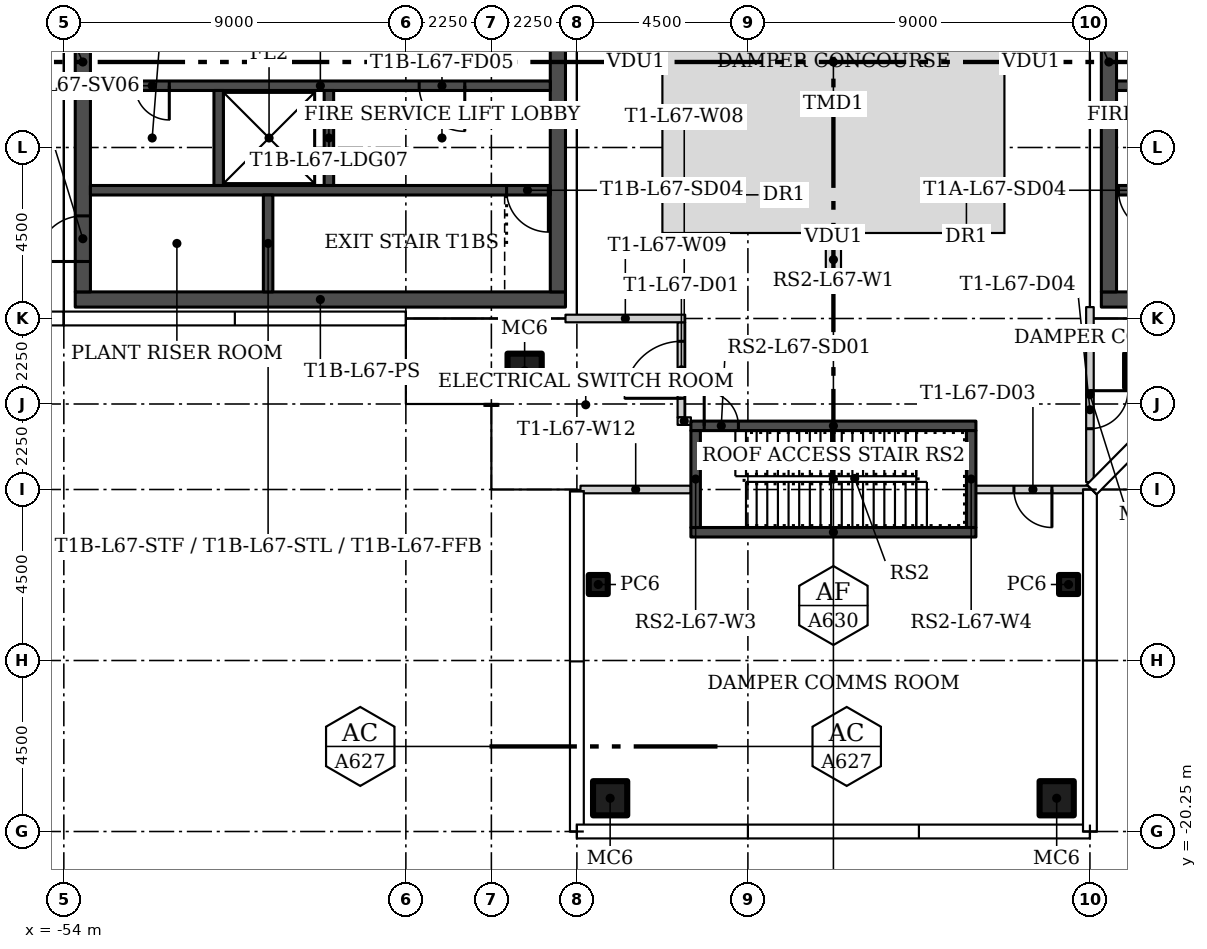
"""IFC4 building model, lengths in metres.
Left out: names, types, materials, properties, quantities, classifications, styles, units other than length and angle.
Written with IfcOpenShell. Run it as: python <this file> out.ifc"""

import sys

from ifc_helpers import new_model, si_unit, direction, frame, frame_2d, origin, origin_2d, place, context, subcontext, project, spatial, rectangle, hollow_rectangle, extrude, element, fill, save


model = new_model("IFC4")
c1 = context("Model", 3, precision=1e-05, world=origin(), true_north=direction((0.0, 1.0)))
c2 = subcontext(c1, "Body", "Model", "MODEL_VIEW")
j1 = project(units=[si_unit("LENGTHUNIT", "METRE"), si_unit("PLANEANGLEUNIT", "RADIAN")], contexts=[c1])
p1 = place(None, origin())
s1 = spatial("IfcSite", under=j1, at=p1, CompositionType="ELEMENT")
p2 = place(p1, origin())
s2 = spatial("IfcBuilding", under=s1, at=p2, CompositionType="ELEMENT")
p3 = place(p2, frame((0.0, 0.0, 278.3)))
s3 = spatial("IfcBuildingStorey", under=s2, at=p3, CompositionType="ELEMENT", Elevation=278.3)
for number, where in (
    (1, (-25.625, -8.125, 0.0)),
    (2, (-41.875, -8.125, 0.0)),
):
    element("IfcColumn", number, at=place(p3, frame(where)), inside=s3, PredefinedType="COLUMN", context=c2, shape_type="SweptSolid", body=[
        extrude(hollow_rectangle(XDim=0.9, YDim=0.9, WallThickness=0.036, at=origin_2d()), origin(), (0.0, 0.0, 1.0), 5.55),
    ])
p4 = place(p3, frame((-39.938, -13.75, 0.0)))
e3 = element("IfcColumn", 3, at=p4, inside=s3, PredefinedType="COLUMN", context=c2, shape_type="SweptSolid", body=[
    extrude(hollow_rectangle(XDim=0.5, YDim=0.5, WallThickness=0.016, at=origin_2d()), origin(), (0.0, 0.0, 1.0), 5.55),
])
p5 = place(p3, frame((-39.625, -19.375, 0.0)))
e4 = element("IfcColumn", 4, at=p5, inside=s3, PredefinedType="COLUMN", context=c2, shape_type="SweptSolid", body=[
    extrude(hollow_rectangle(XDim=0.9, YDim=0.9, WallThickness=0.036, at=origin_2d()), origin(), (0.0, 0.0, 1.0), 5.55),
])
p6 = place(p3, frame((-27.562, -13.75, 0.0)))
e5 = element("IfcColumn", 5, at=p6, inside=s3, PredefinedType="COLUMN", context=c2, shape_type="SweptSolid", body=[
    extrude(hollow_rectangle(XDim=0.5, YDim=0.5, WallThickness=0.016, at=origin_2d()), origin(), (0.0, 0.0, 1.0), 5.55),
])
p7 = place(p3, frame((-27.875, -19.375, 0.0)))
e6 = element("IfcColumn", 6, at=p7, inside=s3, PredefinedType="COLUMN", context=c2, shape_type="SweptSolid", body=[
    extrude(hollow_rectangle(XDim=0.9, YDim=0.9, WallThickness=0.036, at=origin_2d()), origin(), (0.0, 0.0, 1.0), 5.55),
])
p8 = place(p3, frame((-37.75, -9.35, 0.0), z_axis=(0.0, 0.0, 1.0), x_axis=(0.0, 1.0, 0.0)))
e7 = element("IfcWall", 7, at=p8, inside=s3, PredefinedType="PARTITIONING", context=c2, shape_type="SweptSolid", body=[
    extrude(rectangle(XDim=2.5, YDim=0.2, at=frame_2d((1.25, 0.0))), origin(), (0.0, 0.0, 1.0), 5.55),
])
p9 = place(p8, frame((0.5, 0.0, 0.0)))
e8 = element("IfcOpeningElement", 8, at=p9, cuts=e7, PredefinedType="OPENING", context=c2, shape_type="SweptSolid", body=[
    extrude(rectangle(XDim=1.5, YDim=2.4, at=frame_2d((0.75, 1.2))), frame((0.0, 0.11, 0.0), z_axis=(0.0, -1.0, 0.0), x_axis=(1.0, 0.0, 0.0)), (0.0, 0.0, 1.0), 0.22),
])
p10 = place(p3, frame((-37.5, -9.45, 0.0), z_axis=(0.0, 0.0, 1.0), x_axis=(-1.0, 0.0, 0.0)))
e9 = element("IfcWall", 9, at=p10, inside=s3, PredefinedType="PARTITIONING", context=c2, shape_type="SweptSolid", body=[
    extrude(rectangle(XDim=0.35, YDim=0.2, at=frame_2d((0.175, 0.0))), origin(), (0.0, 0.0, 1.0), 5.55),
])
p11 = place(p3, frame((-37.65, -6.75, 0.0), z_axis=(0.0, 0.0, 1.0), x_axis=(-1.0, 0.0, 0.0)))
e10 = element("IfcWall", 10, at=p11, inside=s3, PredefinedType="PARTITIONING", context=c2, shape_type="SweptSolid", body=[
    extrude(rectangle(XDim=3.15, YDim=0.2, at=frame_2d((1.575, 0.0))), origin(), (0.0, 0.0, 1.0), 5.55),
])
p12 = place(p3, frame((-26.995, -11.25, 0.0), z_axis=(0.0, 0.0, 1.0), x_axis=(-1.0, 0.0, 0.0)))
e11 = element("IfcWall", 11, at=p12, inside=s3, PredefinedType="PARTITIONING", context=c2, shape_type="SweptSolid", body=[
    extrude(rectangle(XDim=3.005, YDim=0.2, at=frame_2d((1.502, 0.0))), origin(), (0.0, 0.0, 1.0), 5.55),
])
p13 = place(p12, frame((1.005, 0.0, 0.0)))
e12 = element("IfcOpeningElement", 12, at=p13, cuts=e11, PredefinedType="OPENING", context=c2, shape_type="SweptSolid", body=[
    extrude(rectangle(XDim=1.0, YDim=2.1, at=frame_2d((0.5, 1.05))), frame((0.0, 0.11, 0.0), z_axis=(0.0, -1.0, 0.0), x_axis=(1.0, 0.0, 0.0)), (0.0, 0.0, 1.0), 0.22),
])
p14 = place(p3, frame((-27.0, -6.45, 0.0), z_axis=(0.0, 0.0, 1.0), x_axis=(0.0, -1.0, 0.0)))
e13 = element("IfcWall", 13, at=p14, inside=s3, PredefinedType="PARTITIONING", context=c2, shape_type="SweptSolid", body=[
    extrude(rectangle(XDim=4.605, YDim=0.2, at=frame_2d((2.302, 0.0))), origin(), (0.0, 0.0, 1.0), 5.55),
])
p15 = place(p14, frame((2.2, 0.0, 0.0)))
e14 = element("IfcOpeningElement", 14, at=p15, cuts=e13, PredefinedType="OPENING", context=c2, shape_type="SweptSolid", body=[
    extrude(rectangle(XDim=1.0, YDim=2.1, at=frame_2d((0.5, 1.05))), frame((0.0, 0.11, 0.0), z_axis=(0.0, -1.0, 0.0), x_axis=(1.0, 0.0, 0.0)), (0.0, 0.0, 1.0), 0.22),
])
p16 = place(p3, frame((-40.405, -11.25, 0.0)))
e15 = element("IfcWall", 15, at=p16, inside=s3, PredefinedType="PARTITIONING", context=c2, shape_type="SweptSolid", body=[
    extrude(rectangle(XDim=2.905, YDim=0.2, at=frame_2d((1.453, 0.0))), origin(), (0.0, 0.0, 1.0), 5.55),
])
p17 = place(p3, frame((-26.7, -6.25, 0.0)))
e16 = element("IfcWall", 16, at=p17, inside=s3, PredefinedType="SHEAR", context=c2, shape_type="SweptSolid", body=[
    extrude(rectangle(XDim=12.9, YDim=0.4, at=frame_2d((6.45, 0.0))), origin(), (0.0, 0.0, 1.0), 5.55),
])
p18 = place(p3, frame((-26.5, 6.05, 0.0), z_axis=(0.0, 0.0, 1.0), x_axis=(0.0, -1.0, 0.0)))
e17 = element("IfcWall", 17, at=p18, inside=s3, PredefinedType="SHEAR", context=c2, shape_type="SweptSolid", body=[
    extrude(rectangle(XDim=12.1, YDim=0.4, at=frame_2d((6.05, 0.0))), origin(), (0.0, 0.0, 1.0), 5.55),
])
p19 = place(p18, frame((3.9, 0.0, 0.0)))
e18 = element("IfcOpeningElement", 18, at=p19, cuts=e17, PredefinedType="OPENING", context=c2, shape_type="SweptSolid", body=[
    extrude(rectangle(XDim=1.8, YDim=2.4, at=frame_2d((0.9, 1.2))), frame((0.0, 0.21, 0.0), z_axis=(0.0, -1.0, 0.0), x_axis=(1.0, 0.0, 0.0)), (0.0, 0.0, 1.0), 0.42),
])
p20 = place(p3, frame((-14.2, -3.375, 0.0), z_axis=(0.0, 0.0, 1.0), x_axis=(-1.0, 0.0, 0.0)))
e19 = element("IfcWall", 19, at=p20, inside=s3, PredefinedType="SHEAR", context=c2, shape_type="SweptSolid", body=[
    extrude(rectangle(XDim=12.1, YDim=0.25, at=frame_2d((6.05, 0.0))), origin(), (0.0, 0.0, 1.0), 5.55),
])
p21 = place(p20, frame((10.95, 0.0, 0.0)))
e20 = element("IfcOpeningElement", 20, at=p21, cuts=e19, PredefinedType="OPENING", context=c2, shape_type="SweptSolid", body=[
    extrude(rectangle(XDim=1.1, YDim=2.1, at=frame_2d((0.55, 1.05))), frame((0.0, 0.135, 0.0), z_axis=(0.0, -1.0, 0.0), x_axis=(1.0, 0.0, 0.0)), (0.0, 0.0, 1.0), 0.27),
])
p22 = place(p3, frame((-14.2, -0.625, 0.0), z_axis=(0.0, 0.0, 1.0), x_axis=(-1.0, 0.0, 0.0)))
e21 = element("IfcWall", 21, at=p22, inside=s3, PredefinedType="SHEAR", context=c2, shape_type="SweptSolid", body=[
    extrude(rectangle(XDim=12.1, YDim=0.25, at=frame_2d((6.05, 0.0))), origin(), (0.0, 0.0, 1.0), 5.55),
])
p23 = place(p22, frame((8.65, 0.0, 0.0)))
e22 = element("IfcOpeningElement", 22, at=p23, cuts=e21, PredefinedType="OPENING", context=c2, shape_type="SweptSolid", body=[
    extrude(rectangle(XDim=1.2, YDim=2.1, at=frame_2d((0.6, 1.05))), frame((0.0, 0.135, 0.0), z_axis=(0.0, -1.0, 0.0), x_axis=(1.0, 0.0, 0.0)), (0.0, 0.0, 1.0), 0.27),
])
p24 = place(p22, frame((1.175, 0.0, 0.0)))
e23 = element("IfcOpeningElement", 23, at=p24, cuts=e21, PredefinedType="OPENING", context=c2, shape_type="SweptSolid", body=[
    extrude(rectangle(XDim=0.9, YDim=2.1, at=frame_2d((0.45, 1.05))), frame((0.0, 0.135, 0.0), z_axis=(0.0, -1.0, 0.0), x_axis=(1.0, 0.0, 0.0)), (0.0, 0.0, 1.0), 0.27),
])
p25 = place(p3, frame((-40.8, -6.25, 0.0), z_axis=(0.0, 0.0, 1.0), x_axis=(-1.0, 0.0, 0.0)))
e24 = element("IfcWall", 24, at=p25, inside=s3, PredefinedType="SHEAR", context=c2, shape_type="SweptSolid", body=[
    extrude(rectangle(XDim=12.9, YDim=0.4, at=frame_2d((6.45, 0.0))), origin(), (0.0, 0.0, 1.0), 5.55),
])
p26 = place(p3, frame((-41.0, -6.05, 0.0), z_axis=(0.0, 0.0, 1.0), x_axis=(0.0, 1.0, 0.0)))
e25 = element("IfcWall", 25, at=p26, inside=s3, PredefinedType="SHEAR", context=c2, shape_type="SweptSolid", body=[
    extrude(rectangle(XDim=12.1, YDim=0.4, at=frame_2d((6.05, 0.0))), origin(), (0.0, 0.0, 1.0), 5.55),
])
p27 = place(p26, frame((6.4, 0.0, 0.0)))
e26 = element("IfcOpeningElement", 26, at=p27, cuts=e25, PredefinedType="OPENING", context=c2, shape_type="SweptSolid", body=[
    extrude(rectangle(XDim=1.8, YDim=2.4, at=frame_2d((0.9, 1.2))), frame((0.0, 0.21, 0.0), z_axis=(0.0, -1.0, 0.0), x_axis=(1.0, 0.0, 0.0)), (0.0, 0.0, 1.0), 0.42),
])
p28 = place(p3, frame((-53.5, -6.05, 0.0), z_axis=(0.0, 0.0, 1.0), x_axis=(0.0, 1.0, 0.0)))
e27 = element("IfcWall", 27, at=p28, inside=s3, PredefinedType="SHEAR", context=c2, shape_type="SweptSolid", body=[
    extrude(rectangle(XDim=12.1, YDim=0.4, at=frame_2d((6.05, 0.0))), origin(), (0.0, 0.0, 1.0), 5.55),
])
p29 = place(p28, frame((0.8, 0.0, 0.0)))
e28 = element("IfcOpeningElement", 28, at=p29, cuts=e27, PredefinedType="OPENING", context=c2, shape_type="SweptSolid", body=[
    extrude(rectangle(XDim=1.2, YDim=2.1, at=frame_2d((0.6, 1.05))), frame((0.0, 0.21, 0.0), z_axis=(0.0, -1.0, 0.0), x_axis=(1.0, 0.0, 0.0)), (0.0, 0.0, 1.0), 0.42),
])
p30 = place(p28, frame((6.4, 0.0, 0.0)))
e29 = element("IfcOpeningElement", 29, at=p30, cuts=e27, PredefinedType="OPENING", context=c2, shape_type="SweptSolid", body=[
    extrude(rectangle(XDim=1.8, YDim=2.4, at=frame_2d((0.9, 1.2))), frame((0.0, 0.21, 0.0), z_axis=(0.0, -1.0, 0.0), x_axis=(1.0, 0.0, 0.0)), (0.0, 0.0, 1.0), 0.42),
])
p31 = place(p3, frame((-41.2, -3.375, 0.0), z_axis=(0.0, 0.0, 1.0), x_axis=(-1.0, 0.0, 0.0)))
e30 = element("IfcWall", 30, at=p31, inside=s3, PredefinedType="SHEAR", context=c2, shape_type="SweptSolid", body=[
    extrude(rectangle(XDim=12.1, YDim=0.25, at=frame_2d((6.05, 0.0))), origin(), (0.0, 0.0, 1.0), 5.55),
])
p32 = place(p31, frame((0.05, 0.0, 0.0)))
e31 = element("IfcOpeningElement", 31, at=p32, cuts=e30, PredefinedType="OPENING", context=c2, shape_type="SweptSolid", body=[
    extrude(rectangle(XDim=1.1, YDim=2.1, at=frame_2d((0.55, 1.05))), frame((0.0, 0.135, 0.0), z_axis=(0.0, -1.0, 0.0), x_axis=(1.0, 0.0, 0.0)), (0.0, 0.0, 1.0), 0.27),
])
p33 = place(p3, frame((-48.625, -6.05, 0.0), z_axis=(0.0, 0.0, 1.0), x_axis=(0.0, 1.0, 0.0)))
e32 = element("IfcWall", 32, at=p33, inside=s3, PredefinedType="SHEAR", context=c2, shape_type="SweptSolid", body=[
    extrude(rectangle(XDim=2.55, YDim=0.25, at=frame_2d((1.275, 0.0))), origin(), (0.0, 0.0, 1.0), 5.55),
])
p34 = place(p3, frame((-41.2, -0.625, 0.0), z_axis=(0.0, 0.0, 1.0), x_axis=(-1.0, 0.0, 0.0)))
e33 = element("IfcWall", 33, at=p34, inside=s3, PredefinedType="SHEAR", context=c2, shape_type="SweptSolid", body=[
    extrude(rectangle(XDim=12.1, YDim=0.25, at=frame_2d((6.05, 0.0))), origin(), (0.0, 0.0, 1.0), 5.55),
])
p35 = place(p34, frame((2.25, 0.0, 0.0)))
e34 = element("IfcOpeningElement", 34, at=p35, cuts=e33, PredefinedType="OPENING", context=c2, shape_type="SweptSolid", body=[
    extrude(rectangle(XDim=1.2, YDim=2.1, at=frame_2d((0.6, 1.05))), frame((0.0, 0.135, 0.0), z_axis=(0.0, -1.0, 0.0), x_axis=(1.0, 0.0, 0.0)), (0.0, 0.0, 1.0), 0.27),
])
p36 = place(p34, frame((10.025, 0.0, 0.0)))
e35 = element("IfcOpeningElement", 35, at=p36, cuts=e33, PredefinedType="OPENING", context=c2, shape_type="SweptSolid", body=[
    extrude(rectangle(XDim=0.9, YDim=2.1, at=frame_2d((0.45, 1.05))), frame((0.0, 0.135, 0.0), z_axis=(0.0, -1.0, 0.0), x_axis=(1.0, 0.0, 0.0)), (0.0, 0.0, 1.0), 0.27),
])
p37 = place(p3, frame((-47.025, -3.25, 0.0), z_axis=(0.0, 0.0, 1.0), x_axis=(0.0, 1.0, 0.0)))
e36 = element("IfcWall", 36, at=p37, inside=s3, PredefinedType="SHEAR", context=c2, shape_type="SweptSolid", body=[
    extrude(rectangle(XDim=2.5, YDim=0.25, at=frame_2d((1.25, 0.0))), origin(), (0.0, 0.0, 1.0), 5.55),
])
p38 = place(p37, frame((0.55, 0.0, 0.0)))
e37 = element("IfcOpeningElement", 37, at=p38, cuts=e36, PredefinedType="OPENING", context=c2, shape_type="SweptSolid", body=[
    extrude(rectangle(XDim=1.4, YDim=2.4, at=frame_2d((0.7, 1.2))), frame((0.0, 0.135, 0.0), z_axis=(0.0, -1.0, 0.0), x_axis=(1.0, 0.0, 0.0)), (0.0, 0.0, 1.0), 0.27),
])
p39 = place(p3, frame((-49.925, -3.25, 0.0), z_axis=(0.0, 0.0, 1.0), x_axis=(0.0, 1.0, 0.0)))
e38 = element("IfcWall", 38, at=p39, inside=s3, PredefinedType="SHEAR", context=c2, shape_type="SweptSolid", body=[
    extrude(rectangle(XDim=2.5, YDim=0.25, at=frame_2d((1.25, 0.0))), origin(), (0.0, 0.0, 1.0), 5.55),
])
p40 = place(p3, frame((-37.5, -9.575, 0.0)))
e39 = element("IfcWall", 39, at=p40, inside=s3, PredefinedType="SHEAR", context=c2, shape_type="SweptSolid", body=[
    extrude(rectangle(XDim=7.5, YDim=0.25, at=frame_2d((3.75, 0.0))), origin(), (0.0, 0.0, 1.0), 5.55),
])
p41 = place(p40, frame((0.35, 0.0, 0.0)))
e40 = element("IfcOpeningElement", 40, at=p41, cuts=e39, PredefinedType="OPENING", context=c2, shape_type="SweptSolid", body=[
    extrude(rectangle(XDim=0.9, YDim=2.1, at=frame_2d((0.45, 1.05))), frame((0.0, 0.135, 0.0), z_axis=(0.0, -1.0, 0.0), x_axis=(1.0, 0.0, 0.0)), (0.0, 0.0, 1.0), 0.27),
])
p42 = place(p3, frame((-37.5, -12.375, 0.0)))
e41 = element("IfcWall", 41, at=p42, inside=s3, PredefinedType="SHEAR", context=c2, shape_type="SweptSolid", body=[
    extrude(rectangle(XDim=7.5, YDim=0.25, at=frame_2d((3.75, 0.0))), origin(), (0.0, 0.0, 1.0), 5.55),
])
for number, where, z_axis, x_axis in (
    (42, (-37.375, -12.25, 0.0), (0.0, 0.0, 1.0), (0.0, 1.0, 0.0)),
    (43, (-30.125, -12.25, 0.0), (0.0, 0.0, 1.0), (0.0, 1.0, 0.0)),
):
    element("IfcWall", number, at=place(p3, frame(where, z_axis=z_axis, x_axis=x_axis)), inside=s3, PredefinedType="SHEAR", context=c2, shape_type="SweptSolid", body=[
        extrude(rectangle(XDim=2.55, YDim=0.25, at=frame_2d((1.275, 0.0))), origin(), (0.0, 0.0, 1.0), 5.55),
    ])
p43 = place(p9, origin())
e44 = element("IfcDoor", 44, at=p43, inside=s3, OperationType="DOUBLE_DOOR_SINGLE_SWING", PredefinedType="DOOR", context=c2, shape_type="SweptSolid", body=[
    extrude(rectangle(XDim=1.5, YDim=2.4, at=frame_2d((0.75, 1.2))), frame((0.0, 0.025, 0.0), z_axis=(0.0, -1.0, 0.0), x_axis=(1.0, 0.0, 0.0)), (0.0, 0.0, 1.0), 0.05),
])
fill(e8, e44)
p44 = place(p13, origin())
e45 = element("IfcDoor", 45, at=p44, inside=s3, OperationType="SINGLE_SWING_LEFT", PredefinedType="DOOR", context=c2, shape_type="SweptSolid", body=[
    extrude(rectangle(XDim=1.0, YDim=2.1, at=frame_2d((0.5, 1.05))), frame((0.0, 0.025, 0.0), z_axis=(0.0, -1.0, 0.0), x_axis=(1.0, 0.0, 0.0)), (0.0, 0.0, 1.0), 0.05),
])
fill(e12, e45)
p45 = place(p15, origin())
e46 = element("IfcDoor", 46, at=p45, inside=s3, OperationType="SINGLE_SWING_RIGHT", PredefinedType="DOOR", context=c2, shape_type="SweptSolid", body=[
    extrude(rectangle(XDim=1.0, YDim=2.1, at=frame_2d((0.5, 1.05))), frame((0.0, 0.025, 0.0), z_axis=(0.0, -1.0, 0.0), x_axis=(1.0, 0.0, 0.0)), (0.0, 0.0, 1.0), 0.05),
])
fill(e14, e46)
p46 = place(p21, origin())
e47 = element("IfcDoor", 47, at=p46, inside=s3, OperationType="SINGLE_SWING_RIGHT", PredefinedType="DOOR", context=c2, shape_type="SweptSolid", body=[
    extrude(rectangle(XDim=1.1, YDim=2.1, at=frame_2d((0.55, 1.05))), frame((0.0, 0.025, 0.0), z_axis=(0.0, -1.0, 0.0), x_axis=(1.0, 0.0, 0.0)), (0.0, 0.0, 1.0), 0.05),
])
fill(e20, e47)
p47 = place(p29, origin())
e48 = element("IfcDoor", 48, at=p47, inside=s3, OperationType="SINGLE_SWING_LEFT", PredefinedType="DOOR", context=c2, shape_type="SweptSolid", body=[
    extrude(rectangle(XDim=1.2, YDim=2.1, at=frame_2d((0.6, 1.05))), frame((0.0, 0.025, 0.0), z_axis=(0.0, -1.0, 0.0), x_axis=(1.0, 0.0, 0.0)), (0.0, 0.0, 1.0), 0.05),
])
fill(e28, e48)
p48 = place(p32, origin())
e49 = element("IfcDoor", 49, at=p48, inside=s3, OperationType="SINGLE_SWING_LEFT", PredefinedType="DOOR", context=c2, shape_type="SweptSolid", body=[
    extrude(rectangle(XDim=1.1, YDim=2.1, at=frame_2d((0.55, 1.05))), frame((0.0, 0.025, 0.0), z_axis=(0.0, -1.0, 0.0), x_axis=(1.0, 0.0, 0.0)), (0.0, 0.0, 1.0), 0.05),
])
fill(e31, e49)
p49 = place(p35, origin())
e50 = element("IfcDoor", 50, at=p49, inside=s3, OperationType="SINGLE_SWING_LEFT", PredefinedType="DOOR", context=c2, shape_type="SweptSolid", body=[
    extrude(rectangle(XDim=1.2, YDim=2.1, at=frame_2d((0.6, 1.05))), frame((0.0, 0.025, 0.0), z_axis=(0.0, -1.0, 0.0), x_axis=(1.0, 0.0, 0.0)), (0.0, 0.0, 1.0), 0.05),
])
fill(e34, e50)
p50 = place(p36, origin())
e51 = element("IfcDoor", 51, at=p50, inside=s3, OperationType="SINGLE_SWING_RIGHT", PredefinedType="DOOR", context=c2, shape_type="SweptSolid", body=[
    extrude(rectangle(XDim=0.9, YDim=2.1, at=frame_2d((0.45, 1.05))), frame((0.0, 0.025, 0.0), z_axis=(0.0, -1.0, 0.0), x_axis=(1.0, 0.0, 0.0)), (0.0, 0.0, 1.0), 0.05),
])
fill(e35, e51)
p51 = place(p38, origin())
e52 = element("IfcDoor", 52, at=p51, inside=s3, OperationType="SLIDING_TO_LEFT", PredefinedType="DOOR", context=c2, shape_type="SweptSolid", body=[
    extrude(rectangle(XDim=1.4, YDim=2.4, at=frame_2d((0.7, 1.2))), frame((0.0, 0.025, 0.0), z_axis=(0.0, -1.0, 0.0), x_axis=(1.0, 0.0, 0.0)), (0.0, 0.0, 1.0), 0.05),
])
fill(e37, e52)
p52 = place(p41, origin())
e53 = element("IfcDoor", 53, at=p52, inside=s3, OperationType="SINGLE_SWING_LEFT", PredefinedType="DOOR", context=c2, shape_type="SweptSolid", body=[
    extrude(rectangle(XDim=0.9, YDim=2.1, at=frame_2d((0.45, 1.05))), frame((0.0, 0.025, 0.0), z_axis=(0.0, -1.0, 0.0), x_axis=(1.0, 0.0, 0.0)), (0.0, 0.0, 1.0), 0.05),
])
fill(e40, e53)
save(model, sys.argv[1])
